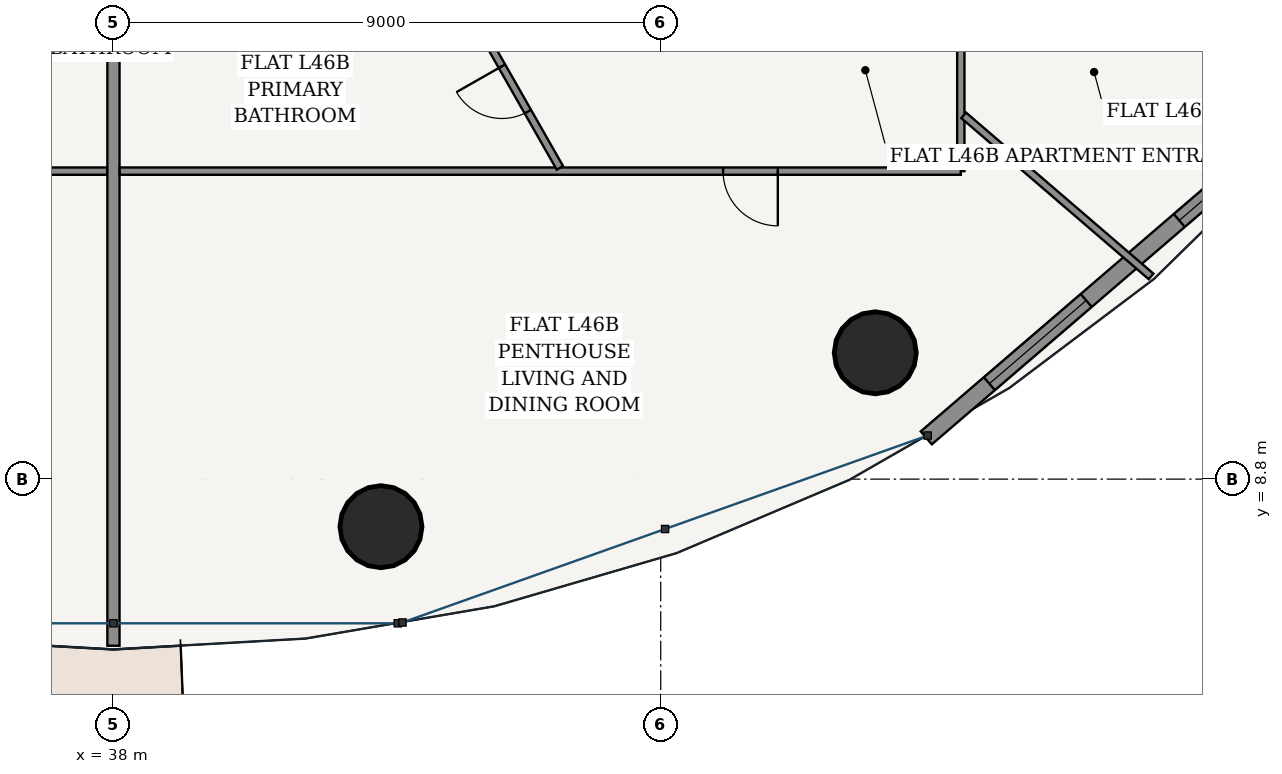
"""IFC4 building model, lengths in metres.
Left out: names, types, materials, properties, quantities, classifications, styles, units other than length and angle.
Written with IfcOpenShell. Run it as: python <this file> out.ifc"""

import sys

from ifc_helpers import new_model, si_unit, direction, frame, frame_2d, origin, origin_2d, place, context, subcontext, project, spatial, rectangle, hollow_circle, extrude, source, transform, mapped, element, fill, save


model = new_model("IFC4")
c1 = context("Model", 3, precision=1e-05, world=origin(), true_north=direction((-0.2419218956, 0.970295726276)))
c2 = subcontext(c1, "Body", "Model", "MODEL_VIEW")
j1 = project(units=[si_unit("LENGTHUNIT", "METRE"), si_unit("PLANEANGLEUNIT", "RADIAN")], contexts=[c1])
p1 = place(None, origin())
s1 = spatial("IfcSite", under=j1, at=p1, CompositionType="ELEMENT")
p2 = place(p1, origin())
s2 = spatial("IfcBuilding", under=s1, at=p2, CompositionType="ELEMENT")
p3 = place(p2, frame((0.0, 0.0, 175.0)))
s3 = spatial("IfcBuildingStorey", under=s2, at=p3, CompositionType="ELEMENT", Elevation=175.0)
for number, where, z_axis, x_axis in (
    (1, (42.399, 8.018, 0.0), (0.0, 0.0, 1.0), (1.0, 0.0, 0.0)),
    (2, (50.528, 10.877, 0.0), (0.0, 0.0, 1.0), (1.0, 0.0, 0.0)),
):
    element("IfcColumn", number, at=place(p3, frame(where, z_axis=z_axis, x_axis=x_axis)), inside=s3, PredefinedType="COLUMN", context=c2, shape_type="SweptSolid", body=[
        extrude(hollow_circle(Radius=0.675, WallThickness=0.042, at=origin_2d()), origin(), (0.0, 0.0, 1.0), 3.6),
    ])
p4 = place(p3, frame((51.367, 9.478, 0.0), z_axis=(0.0, 0.0, 1.0), x_axis=(0.75843401647, 0.651749831348, 0.0)))
e3 = element("IfcWall", 3, at=p4, inside=s3, PredefinedType="SOLIDWALL", context=c2, shape_type="SweptSolid", body=[
    extrude(rectangle(XDim=8.952, YDim=0.28, at=frame_2d((4.476, 0.0))), origin(), (0.0, 0.0, 1.0), 3.33),
])
p5 = place(p4, frame((1.367, 0.0, 0.85)))
e4 = element("IfcOpeningElement", 4, at=p5, cuts=e3, PredefinedType="OPENING", context=c2, shape_type="SweptSolid", body=[
    extrude(rectangle(XDim=2.1, YDim=1.95, at=frame_2d((1.05, 0.975))), frame((0.0, 0.15, 0.0), z_axis=(0.0, -1.0, 0.0), x_axis=(1.0, 0.0, 0.0)), (0.0, 0.0, 1.0), 0.3),
])
p6 = place(p4, frame((5.485, 0.0, 0.85)))
e5 = element("IfcOpeningElement", 5, at=p6, cuts=e3, PredefinedType="OPENING", context=c2, shape_type="SweptSolid", body=[
    extrude(rectangle(XDim=2.1, YDim=1.95, at=frame_2d((1.05, 0.975))), frame((0.0, 0.15, 0.0), z_axis=(0.0, -1.0, 0.0), x_axis=(1.0, 0.0, 0.0)), (0.0, 0.0, 1.0), 0.3),
])
p7 = place(p3, frame((37.898, 13.865, 0.0), z_axis=(0.0, 0.0, 1.0), x_axis=(-1.0, 0.0, 0.0)))
e6 = element("IfcWall", 6, at=p7, inside=s3, PredefinedType="PARTITIONING", context=c2, shape_type="SweptSolid", body=[
    extrude(rectangle(XDim=6.308, YDim=0.12, at=frame_2d((3.154, 0.0))), origin(), (0.0, 0.0, 1.0), 2.776),
])
p8 = place(p3, frame((38.0, 16.515, 0.0), z_axis=(0.0, 0.0, 1.0), x_axis=(0.0, -1.0, 0.0)))
e7 = element("IfcWall", 7, at=p8, inside=s3, PredefinedType="PARTITIONING", context=c2, shape_type="SweptSolid", body=[
    extrude(rectangle(XDim=10.455, YDim=0.2, at=frame_2d((5.228, 0.0))), origin(), (0.0, 0.0, 1.0), 2.846),
])
p9 = place(p3, frame((51.935, 37.885, 0.0), z_axis=(0.0, 0.0, 1.0), x_axis=(0.0, -1.0, 0.0)))
e8 = element("IfcWall", 8, at=p9, inside=s3, PredefinedType="PARTITIONING", context=c2, shape_type="SweptSolid", body=[
    extrude(rectangle(XDim=24.02, YDim=0.12, at=frame_2d((12.01, 0.0))), origin(), (0.0, 0.0, 1.0), 2.776),
])
p10 = place(p9, frame((19.821, 0.0, 0.0)))
e9 = element("IfcOpeningElement", 9, at=p10, cuts=e8, PredefinedType="OPENING", context=c2, shape_type="SweptSolid", body=[
    extrude(rectangle(XDim=0.9, YDim=2.15, at=frame_2d((0.45, 1.075))), frame((0.0, 0.07, 0.0), z_axis=(0.0, -1.0, 0.0), x_axis=(1.0, 0.0, 0.0)), (0.0, 0.0, 1.0), 0.14),
])
p11 = place(p3, frame((51.935, 13.865, 0.0), z_axis=(0.0, 0.0, 1.0), x_axis=(-1.0, 0.0, 0.0)))
e10 = element("IfcWall", 10, at=p11, inside=s3, PredefinedType="PARTITIONING", context=c2, shape_type="SweptSolid", body=[
    extrude(rectangle(XDim=13.833, YDim=0.12, at=frame_2d((6.917, 0.0))), origin(), (0.0, 0.0, 1.0), 2.776),
])
p12 = place(p11, frame((3.009, 0.0, 0.0)))
e11 = element("IfcOpeningElement", 11, at=p12, cuts=e10, PredefinedType="OPENING", context=c2, shape_type="SweptSolid", body=[
    extrude(rectangle(XDim=0.9, YDim=2.15, at=frame_2d((0.45, 1.075))), frame((0.0, 0.07, 0.0), z_axis=(0.0, -1.0, 0.0), x_axis=(1.0, 0.0, 0.0)), (0.0, 0.0, 1.0), 0.14),
])
p13 = place(p3, frame((51.982, 14.782, 0.0), z_axis=(0.0, 0.0, 1.0), x_axis=(0.758356837469, -0.651839632935, 0.0)))
e12 = element("IfcWall", 12, at=p13, inside=s3, PredefinedType="PARTITIONING", context=c2, shape_type="SweptSolid", body=[
    extrude(rectangle(XDim=4.064, YDim=0.12, at=frame_2d((2.032, 0.0))), origin(), (0.0, 0.0, 1.0), 2.846),
])
p14 = place(p3, frame((43.862, 16.515, 0.0), z_axis=(0.0, 0.0, 1.0), x_axis=(0.495214761056, -0.868770591372, 0.0)))
e13 = element("IfcWall", 13, at=p14, inside=s3, PredefinedType="PARTITIONING", context=c2, shape_type="SweptSolid", body=[
    extrude(rectangle(XDim=2.988, YDim=0.12, at=frame_2d((1.494, 0.0))), origin(), (0.0, 0.0, 1.0), 3.005),
])
p15 = place(p14, frame((1.064, 0.0, 0.0)))
e14 = element("IfcOpeningElement", 14, at=p15, cuts=e13, PredefinedType="OPENING", context=c2, shape_type="SweptSolid", body=[
    extrude(rectangle(XDim=0.86, YDim=2.15, at=frame_2d((0.43, 1.075))), frame((0.0, 0.07, 0.0), z_axis=(0.0, -1.0, 0.0), x_axis=(1.0, 0.0, 0.0)), (0.0, 0.0, 1.0), 0.14),
])
m1 = source(origin(), c2, "Body", "SweptSolid", [
    extrude(rectangle(XDim=2.1, YDim=1.95, at=frame_2d((1.05, 0.975))), frame((0.0, 0.03, 0.0), z_axis=(0.0, -1.0, 0.0), x_axis=(1.0, 0.0, 0.0)), (0.0, 0.0, 1.0), 0.06),
])
p16 = place(p5, origin())
e15 = element("IfcWindow", 15, at=p16, inside=s3, PartitioningType="SINGLE_PANEL", PredefinedType="WINDOW", context=c2, shape_type="MappedRepresentation", body=[
    mapped(m1, transform((0.0, 0.0, 0.0), scale=1.0)),
])
fill(e4, e15)
p17 = place(p6, origin())
e16 = element("IfcWindow", 16, at=p17, inside=s3, PartitioningType="SINGLE_PANEL", PredefinedType="WINDOW", context=c2, shape_type="MappedRepresentation", body=[
    mapped(m1, transform((0.0, 0.0, 0.0), scale=1.0)),
])
fill(e5, e16)
m2 = source(origin(), c2, "Body", "SweptSolid", [
    extrude(rectangle(XDim=0.86, YDim=2.15, at=frame_2d((0.43, 1.075))), frame((0.0, 0.025, 0.0), z_axis=(0.0, -1.0, 0.0), x_axis=(1.0, 0.0, 0.0)), (0.0, 0.0, 1.0), 0.05),
])
p18 = place(p15, frame((0.86, 0.0, 0.0), z_axis=(0.0, 0.0, 1.0), x_axis=(-1.0, 0.0, 0.0)))
e17 = element("IfcDoor", 17, at=p18, inside=s3, OperationType="SINGLE_SWING_RIGHT", PredefinedType="DOOR", context=c2, shape_type="MappedRepresentation", body=[
    mapped(m2, transform((0.0, 0.0, 0.0), scale=1.0)),
])
fill(e14, e17)
m3 = source(origin(), c2, "Body", "SweptSolid", [
    extrude(rectangle(XDim=0.9, YDim=2.15, at=frame_2d((0.45, 1.075))), frame((0.0, 0.025, 0.0), z_axis=(0.0, -1.0, 0.0), x_axis=(1.0, 0.0, 0.0)), (0.0, 0.0, 1.0), 0.05),
])
p19 = place(p12, origin())
e18 = element("IfcDoor", 18, at=p19, inside=s3, OperationType="SINGLE_SWING_LEFT", PredefinedType="DOOR", context=c2, shape_type="MappedRepresentation", body=[
    mapped(m3, transform((0.0, 0.0, 0.0), scale=1.0)),
])
fill(e11, e18)
save(model, sys.argv[1])
